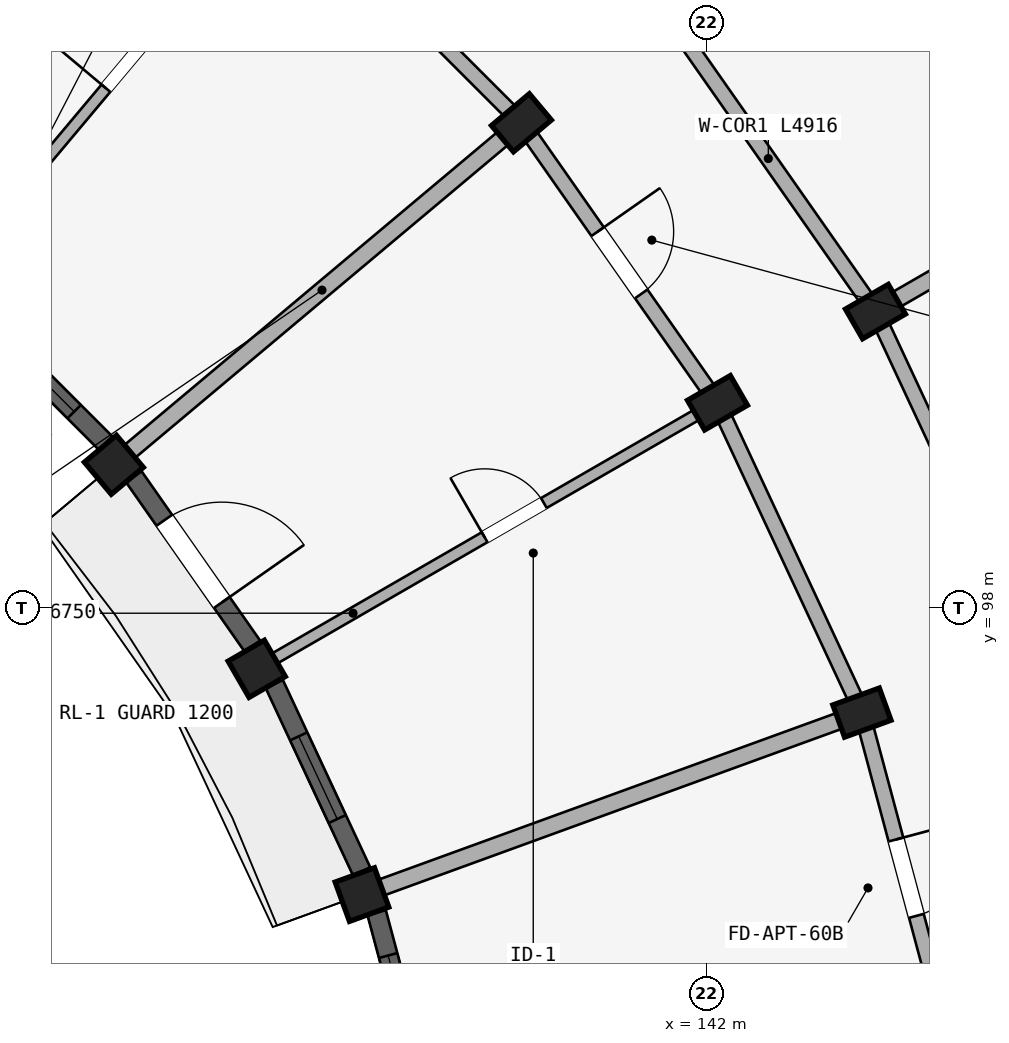
"""IFC4 building model, lengths in metres.
Left out: names, types, materials, properties, quantities, classifications, styles, units other than length and angle.
Written with IfcOpenShell. Run it as: python <this file> out.ifc"""

import sys

from ifc_helpers import new_model, si_unit, direction, frame, frame_2d, origin, origin_2d, place, context, subcontext, project, spatial, rectangle, extrude, element, fill, save


model = new_model("IFC4")
c1 = context("Model", 3, precision=1e-05, world=origin(), true_north=direction((0.0, 1.0)))
c2 = subcontext(c1, "Body", "Model", "MODEL_VIEW")
j1 = project(units=[si_unit("LENGTHUNIT", "METRE"), si_unit("PLANEANGLEUNIT", "RADIAN")], contexts=[c1])
p1 = place(None, origin())
s1 = spatial("IfcSite", under=j1, at=p1, CompositionType="ELEMENT")
p2 = place(p1, origin())
s2 = spatial("IfcBuilding", under=s1, at=p2, CompositionType="ELEMENT")
p3 = place(p2, frame((0.0, 0.0, 37.05)))
s3 = spatial("IfcBuildingStorey", under=s2, at=p3, CompositionType="ELEMENT", Elevation=37.05)
p4 = place(p3, frame((134.202, 99.885, 0.0), z_axis=(0.0, 0.0, 1.0), x_axis=(-0.642787609687, 0.766044443119, 0.0)))
e1 = element("IfcColumn", 1, at=p4, inside=s3, PredefinedType="COLUMN", context=c2, shape_type="SweptSolid", body=[
    extrude(rectangle(XDim=0.55, YDim=0.55, at=origin_2d()), origin(), (0.0, 0.0, 1.0), 2.93),
])
p5 = place(p3, frame((139.564, 104.384, 0.0), z_axis=(0.0, 0.0, 1.0), x_axis=(-0.642787609687, 0.766044443119, 0.0)))
e2 = element("IfcColumn", 2, at=p5, inside=s3, PredefinedType="COLUMN", context=c2, shape_type="SweptSolid", body=[
    extrude(rectangle(XDim=0.45, YDim=0.65, at=origin_2d()), origin(), (0.0, 0.0, 1.0), 2.93),
])
p6 = place(p3, frame((136.081, 97.2, 0.0), z_axis=(0.0, 0.0, 1.0), x_axis=(-0.5, 0.866025403784, 0.0)))
e3 = element("IfcColumn", 3, at=p6, inside=s3, PredefinedType="COLUMN", context=c2, shape_type="SweptSolid", body=[
    extrude(rectangle(XDim=0.55, YDim=0.55, at=origin_2d()), origin(), (0.0, 0.0, 1.0), 2.93),
])
for number, where, z_axis, x_axis in (
    (4, (142.144, 100.7, 0.0), (0.0, 0.0, 1.0), (-0.5, 0.866, 0.0)),
    (5, (144.222, 101.9, 0.0), (0.0, 0.0, 1.0), (-0.5, 0.866, 0.0)),
):
    element("IfcColumn", number, at=place(p3, frame(where, z_axis=z_axis, x_axis=x_axis)), inside=s3, PredefinedType="COLUMN", context=c2, shape_type="SweptSolid", body=[
        extrude(rectangle(XDim=0.45, YDim=0.65, at=origin_2d()), origin(), (0.0, 0.0, 1.0), 2.93),
    ])
p7 = place(p3, frame((137.466, 94.23, 0.0), z_axis=(0.0, 0.0, 1.0), x_axis=(-0.342020143326, 0.939692620786, 0.0)))
e6 = element("IfcColumn", 6, at=p7, inside=s3, PredefinedType="COLUMN", context=c2, shape_type="SweptSolid", body=[
    extrude(rectangle(XDim=0.55, YDim=0.55, at=origin_2d()), origin(), (0.0, 0.0, 1.0), 2.93),
])
p8 = place(p3, frame((144.044, 96.624, 0.0), z_axis=(0.0, 0.0, 1.0), x_axis=(-0.342020143326, 0.939692620786, 0.0)))
e7 = element("IfcColumn", 7, at=p8, inside=s3, PredefinedType="COLUMN", context=c2, shape_type="SweptSolid", body=[
    extrude(rectangle(XDim=0.45, YDim=0.65, at=origin_2d()), origin(), (0.0, 0.0, 1.0), 2.93),
])
p9 = place(p3, frame((136.384, 107.564, 0.0), z_axis=(0.0, 0.0, 1.0), x_axis=(0.707106781187, -0.707106781187, 0.0)))
e8 = element("IfcWall", 8, at=p9, inside=s3, PredefinedType="STANDARD", context=c2, shape_type="SweptSolid", body=[
    extrude(rectangle(XDim=4.497, YDim=0.2, at=frame_2d((2.249, 0.0))), origin(), (0.0, 0.0, 1.0), 2.372),
])
p10 = place(p3, frame((139.564, 104.384, 0.0), z_axis=(0.0, 0.0, 1.0), x_axis=(0.573571637217, -0.819155404658, 0.0)))
e9 = element("IfcWall", 9, at=p10, inside=s3, PredefinedType="STANDARD", context=c2, shape_type="SweptSolid", body=[
    extrude(rectangle(XDim=4.497, YDim=0.2, at=frame_2d((2.249, 0.0))), origin(), (0.0, 0.0, 1.0), 2.372),
])
p11 = place(p10, frame((1.749, 0.0, 0.0)))
e10 = element("IfcOpeningElement", 10, at=p11, cuts=e9, PredefinedType="OPENING", context=c2, shape_type="SweptSolid", body=[
    extrude(rectangle(XDim=1.0, YDim=2.15, at=frame_2d((0.5, 1.075))), frame((0.0, 0.11, 0.0), z_axis=(0.0, -1.0, 0.0), x_axis=(1.0, 0.0, 0.0)), (0.0, 0.0, 1.0), 0.22),
])
p12 = place(p3, frame((141.402, 105.927, 0.0), z_axis=(0.0, 0.0, 1.0), x_axis=(0.573592335331, -0.819140911474, 0.0)))
e11 = element("IfcWall", 11, at=p12, inside=s3, PredefinedType="STANDARD", context=c2, shape_type="SweptSolid", body=[
    extrude(rectangle(XDim=4.916, YDim=0.2, at=frame_2d((2.458, 0.0))), origin(), (0.0, 0.0, 1.0), 2.372),
])
p13 = place(p3, frame((142.144, 100.7, 0.0), z_axis=(0.0, 0.0, 1.0), x_axis=(0.422617978463, -0.906307919131, 0.0)))
e12 = element("IfcWall", 12, at=p13, inside=s3, PredefinedType="STANDARD", context=c2, shape_type="SweptSolid", body=[
    extrude(rectangle(XDim=4.497, YDim=0.2, at=frame_2d((2.249, 0.0))), origin(), (0.0, 0.0, 1.0), 2.372),
])
p14 = place(p3, frame((144.222, 101.9, 0.0), z_axis=(0.0, 0.0, 1.0), x_axis=(0.422629854778, -0.906302381024, 0.0)))
e13 = element("IfcWall", 13, at=p14, inside=s3, PredefinedType="STANDARD", context=c2, shape_type="SweptSolid", body=[
    extrude(rectangle(XDim=4.915, YDim=0.2, at=frame_2d((2.458, 0.0))), origin(), (0.0, 0.0, 1.0), 2.372),
])
p15 = place(p14, frame((1.958, 0.0, 0.0)))
e14 = element("IfcOpeningElement", 14, at=p15, cuts=e13, PredefinedType="OPENING", context=c2, shape_type="SweptSolid", body=[
    extrude(rectangle(XDim=1.0, YDim=2.15, at=frame_2d((0.5, 1.075))), frame((0.0, 0.11, 0.0), z_axis=(0.0, -1.0, 0.0), x_axis=(1.0, 0.0, 0.0)), (0.0, 0.0, 1.0), 0.22),
])
p16 = place(p3, frame((144.044, 96.624, 0.0), z_axis=(0.0, 0.0, 1.0), x_axis=(0.258787642463, -0.965934240054, 0.0)))
e15 = element("IfcWall", 15, at=p16, inside=s3, PredefinedType="STANDARD", context=c2, shape_type="SweptSolid", body=[
    extrude(rectangle(XDim=4.497, YDim=0.2, at=frame_2d((2.249, 0.0))), origin(), (0.0, 0.0, 1.0), 2.372),
])
p17 = place(p16, frame((1.729, 0.0, 0.0)))
e16 = element("IfcOpeningElement", 16, at=p17, cuts=e15, PredefinedType="OPENING", context=c2, shape_type="SweptSolid", body=[
    extrude(rectangle(XDim=1.04, YDim=2.15, at=frame_2d((0.52, 1.075))), frame((0.0, 0.11, 0.0), z_axis=(0.0, -1.0, 0.0), x_axis=(1.0, 0.0, 0.0)), (0.0, 0.0, 1.0), 0.22),
])
p18 = place(p3, frame((132.013, 102.355, 0.0), z_axis=(0.0, 0.0, 1.0), x_axis=(0.642784846501, 0.766046761698, 0.0)))
e17 = element("IfcWall", 17, at=p18, inside=s3, PredefinedType="PARTITIONING", context=c2, shape_type="SweptSolid", body=[
    extrude(rectangle(XDim=6.75, YDim=0.15, at=frame_2d((3.375, 0.0))), origin(), (0.0, 0.0, 1.0), 2.372),
])
p19 = place(p18, frame((3.242, 0.0, 0.0)))
e18 = element("IfcOpeningElement", 18, at=p19, cuts=e17, PredefinedType="OPENING", context=c2, shape_type="SweptSolid", body=[
    extrude(rectangle(XDim=0.94, YDim=2.1, at=frame_2d((0.47, 1.05))), frame((0.0, 0.085, 0.0), z_axis=(0.0, -1.0, 0.0), x_axis=(1.0, 0.0, 0.0)), (0.0, 0.0, 1.0), 0.17),
])
p20 = place(p3, frame((134.355, 100.013, 0.0), z_axis=(0.0, 0.0, 1.0), x_axis=(0.766046761698, 0.642784846501, 0.0)))
e19 = element("IfcWall", 19, at=p20, inside=s3, PredefinedType="STANDARD", context=c2, shape_type="SweptSolid", body=[
    extrude(rectangle(XDim=6.75, YDim=0.22, at=frame_2d((3.375, 0.0))), origin(), (0.0, 0.0, 1.0), 2.372),
])
p21 = place(p3, frame((136.254, 97.3, 0.0), z_axis=(0.0, 0.0, 1.0), x_axis=(0.866026575979, 0.499997969693, 0.0)))
e20 = element("IfcWall", 20, at=p21, inside=s3, PredefinedType="PARTITIONING", context=c2, shape_type="SweptSolid", body=[
    extrude(rectangle(XDim=6.75, YDim=0.15, at=frame_2d((3.375, 0.0))), origin(), (0.0, 0.0, 1.0), 2.372),
])
p22 = place(p21, frame((3.262, 0.0, 0.0)))
e21 = element("IfcOpeningElement", 21, at=p22, cuts=e20, PredefinedType="OPENING", context=c2, shape_type="SweptSolid", body=[
    extrude(rectangle(XDim=0.9, YDim=2.1, at=frame_2d((0.45, 1.05))), frame((0.0, 0.085, 0.0), z_axis=(0.0, -1.0, 0.0), x_axis=(1.0, 0.0, 0.0)), (0.0, 0.0, 1.0), 0.17),
])
p23 = place(p3, frame((144.309, 101.95, 0.0), z_axis=(0.0, 0.0, 1.0), x_axis=(0.866024222538, 0.500002045973, 0.0)))
e22 = element("IfcWall", 22, at=p23, inside=s3, PredefinedType="STANDARD", context=c2, shape_type="SweptSolid", body=[
    extrude(rectangle(XDim=9.02, YDim=0.22, at=frame_2d((4.51, 0.0))), origin(), (0.0, 0.0, 1.0), 2.372),
])
p24 = place(p3, frame((137.654, 94.298, 0.0), z_axis=(0.0, 0.0, 1.0), x_axis=(0.939696231917, 0.342010221662, 0.0)))
e23 = element("IfcWall", 23, at=p24, inside=s3, PredefinedType="STANDARD", context=c2, shape_type="SweptSolid", body=[
    extrude(rectangle(XDim=6.75, YDim=0.22, at=frame_2d((3.375, 0.0))), origin(), (0.0, 0.0, 1.0), 2.372),
])
p25 = place(p3, frame((132.17, 102.093, 0.0), z_axis=(0.0, 0.0, 1.0), x_axis=(0.707106781187, -0.707106781187, 0.0)))
e24 = element("IfcWall", 24, at=p25, inside=s3, PredefinedType="STANDARD", context=c2, shape_type="SweptSolid", body=[
    extrude(rectangle(XDim=2.72, YDim=0.25, at=frame_2d((1.36, 0.0))), origin(), (0.0, 0.0, 1.0), 2.422),
])
p26 = place(p25, frame((0.585, 0.0, 0.622)))
e25 = element("IfcOpeningElement", 25, at=p26, cuts=e24, PredefinedType="OPENING", context=c2, shape_type="SweptSolid", body=[
    extrude(rectangle(XDim=1.55, YDim=1.6, at=frame_2d((0.775, 0.8))), frame((0.0, 0.135, 0.0), z_axis=(0.0, -1.0, 0.0), x_axis=(1.0, 0.0, 0.0)), (0.0, 0.0, 1.0), 0.27),
])
p27 = place(p3, frame((134.464, 99.728, 0.0), z_axis=(0.0, 0.0, 1.0), x_axis=(0.573612950921, -0.819126475299, 0.0)))
e26 = element("IfcWall", 26, at=p27, inside=s3, PredefinedType="STANDARD", context=c2, shape_type="SweptSolid", body=[
    extrude(rectangle(XDim=2.72, YDim=0.25, at=frame_2d((1.36, 0.0))), origin(), (0.0, 0.0, 1.0), 2.422),
])
p28 = place(p27, frame((0.7, 0.0, 0.0)))
e27 = element("IfcOpeningElement", 27, at=p28, cuts=e26, PredefinedType="OPENING", context=c2, shape_type="SweptSolid", body=[
    extrude(rectangle(XDim=1.32, YDim=2.15, at=frame_2d((0.66, 1.075))), frame((0.0, 0.135, 0.0), z_axis=(0.0, -1.0, 0.0), x_axis=(1.0, 0.0, 0.0)), (0.0, 0.0, 1.0), 0.27),
])
p29 = place(p3, frame((136.312, 97.0, 0.0), z_axis=(0.0, 0.0, 1.0), x_axis=(0.422629903269, -0.906302358412, 0.0)))
e28 = element("IfcWall", 28, at=p29, inside=s3, PredefinedType="STANDARD", context=c2, shape_type="SweptSolid", body=[
    extrude(rectangle(XDim=2.72, YDim=0.25, at=frame_2d((1.36, 0.0))), origin(), (0.0, 0.0, 1.0), 2.422),
])
p30 = place(p29, frame((0.76, 0.0, 0.722)))
e29 = element("IfcOpeningElement", 29, at=p30, cuts=e28, PredefinedType="OPENING", context=c2, shape_type="SweptSolid", body=[
    extrude(rectangle(XDim=1.2, YDim=1.5, at=frame_2d((0.6, 0.75))), frame((0.0, 0.135, 0.0), z_axis=(0.0, -1.0, 0.0), x_axis=(1.0, 0.0, 0.0)), (0.0, 0.0, 1.0), 0.27),
])
p31 = place(p3, frame((137.659, 93.993, 0.0), z_axis=(0.0, 0.0, 1.0), x_axis=(0.258807879411, -0.965928818058, 0.0)))
e30 = element("IfcWall", 30, at=p31, inside=s3, PredefinedType="STANDARD", context=c2, shape_type="SweptSolid", body=[
    extrude(rectangle(XDim=2.72, YDim=0.25, at=frame_2d((1.36, 0.0))), origin(), (0.0, 0.0, 1.0), 2.422),
])
p32 = place(p31, frame((0.585, 0.0, 0.622)))
e31 = element("IfcOpeningElement", 31, at=p32, cuts=e30, PredefinedType="OPENING", context=c2, shape_type="SweptSolid", body=[
    extrude(rectangle(XDim=1.55, YDim=1.6, at=frame_2d((0.775, 0.8))), frame((0.0, 0.135, 0.0), z_axis=(0.0, -1.0, 0.0), x_axis=(1.0, 0.0, 0.0)), (0.0, 0.0, 1.0), 0.27),
])
p33 = place(p26, origin())
e32 = element("IfcWindow", 32, at=p33, inside=s3, PartitioningType="DOUBLE_PANEL_VERTICAL", PredefinedType="WINDOW", context=c2, shape_type="SweptSolid", body=[
    extrude(rectangle(XDim=1.55, YDim=1.6, at=frame_2d((0.775, 0.8))), frame((0.0, 0.03, 0.0), z_axis=(0.0, -1.0, 0.0), x_axis=(1.0, 0.0, 0.0)), (0.0, 0.0, 1.0), 0.06),
])
fill(e25, e32)
p34 = place(p30, origin())
e33 = element("IfcWindow", 33, at=p34, inside=s3, PartitioningType="SINGLE_PANEL", PredefinedType="WINDOW", context=c2, shape_type="SweptSolid", body=[
    extrude(rectangle(XDim=1.2, YDim=1.5, at=frame_2d((0.6, 0.75))), frame((0.0, 0.03, 0.0), z_axis=(0.0, -1.0, 0.0), x_axis=(1.0, 0.0, 0.0)), (0.0, 0.0, 1.0), 0.06),
])
fill(e29, e33)
p35 = place(p32, origin())
e34 = element("IfcWindow", 34, at=p35, inside=s3, PartitioningType="DOUBLE_PANEL_VERTICAL", PredefinedType="WINDOW", context=c2, shape_type="SweptSolid", body=[
    extrude(rectangle(XDim=1.55, YDim=1.6, at=frame_2d((0.775, 0.8))), frame((0.0, 0.03, 0.0), z_axis=(0.0, -1.0, 0.0), x_axis=(1.0, 0.0, 0.0)), (0.0, 0.0, 1.0), 0.06),
])
fill(e31, e34)
p36 = place(p19, frame((0.94, 0.0, 0.0), z_axis=(0.0, 0.0, 1.0), x_axis=(-1.0, 0.0, 0.0)))
e35 = element("IfcDoor", 35, at=p36, inside=s3, OperationType="SINGLE_SWING_RIGHT", PredefinedType="DOOR", context=c2, shape_type="SweptSolid", body=[
    extrude(rectangle(XDim=0.94, YDim=2.1, at=frame_2d((0.47, 1.05))), frame((0.0, 0.025, 0.0), z_axis=(0.0, -1.0, 0.0), x_axis=(1.0, 0.0, 0.0)), (0.0, 0.0, 1.0), 0.05),
])
fill(e18, e35)
p37 = place(p22, origin())
e36 = element("IfcDoor", 36, at=p37, inside=s3, OperationType="SINGLE_SWING_LEFT", PredefinedType="DOOR", context=c2, shape_type="SweptSolid", body=[
    extrude(rectangle(XDim=0.9, YDim=2.1, at=frame_2d((0.45, 1.05))), frame((0.0, 0.025, 0.0), z_axis=(0.0, -1.0, 0.0), x_axis=(1.0, 0.0, 0.0)), (0.0, 0.0, 1.0), 0.05),
])
fill(e21, e36)
p38 = place(p11, frame((1.0, 0.0, 0.0), z_axis=(0.0, 0.0, 1.0), x_axis=(-1.0, 0.0, 0.0)))
e37 = element("IfcDoor", 37, at=p38, inside=s3, OperationType="SINGLE_SWING_RIGHT", PredefinedType="DOOR", context=c2, shape_type="SweptSolid", body=[
    extrude(rectangle(XDim=1.0, YDim=2.15, at=frame_2d((0.5, 1.075))), frame((0.0, 0.025, 0.0), z_axis=(0.0, -1.0, 0.0), x_axis=(1.0, 0.0, 0.0)), (0.0, 0.0, 1.0), 0.05),
])
fill(e10, e37)
p39 = place(p17, origin())
e38 = element("IfcDoor", 38, at=p39, inside=s3, OperationType="SINGLE_SWING_LEFT", PredefinedType="DOOR", context=c2, shape_type="SweptSolid", body=[
    extrude(rectangle(XDim=1.04, YDim=2.15, at=frame_2d((0.52, 1.075))), frame((0.0, 0.025, 0.0), z_axis=(0.0, -1.0, 0.0), x_axis=(1.0, 0.0, 0.0)), (0.0, 0.0, 1.0), 0.05),
])
fill(e16, e38)
p40 = place(p28, frame((1.32, 0.0, 0.0), z_axis=(0.0, 0.0, 1.0), x_axis=(-1.0, 0.0, 0.0)))
e39 = element("IfcDoor", 39, at=p40, inside=s3, OperationType="SINGLE_SWING_LEFT", PredefinedType="DOOR", context=c2, shape_type="SweptSolid", body=[
    extrude(rectangle(XDim=1.32, YDim=2.15, at=frame_2d((0.66, 1.075))), frame((0.0, 0.025, 0.0), z_axis=(0.0, -1.0, 0.0), x_axis=(1.0, 0.0, 0.0)), (0.0, 0.0, 1.0), 0.05),
])
fill(e27, e39)
save(model, sys.argv[1])
